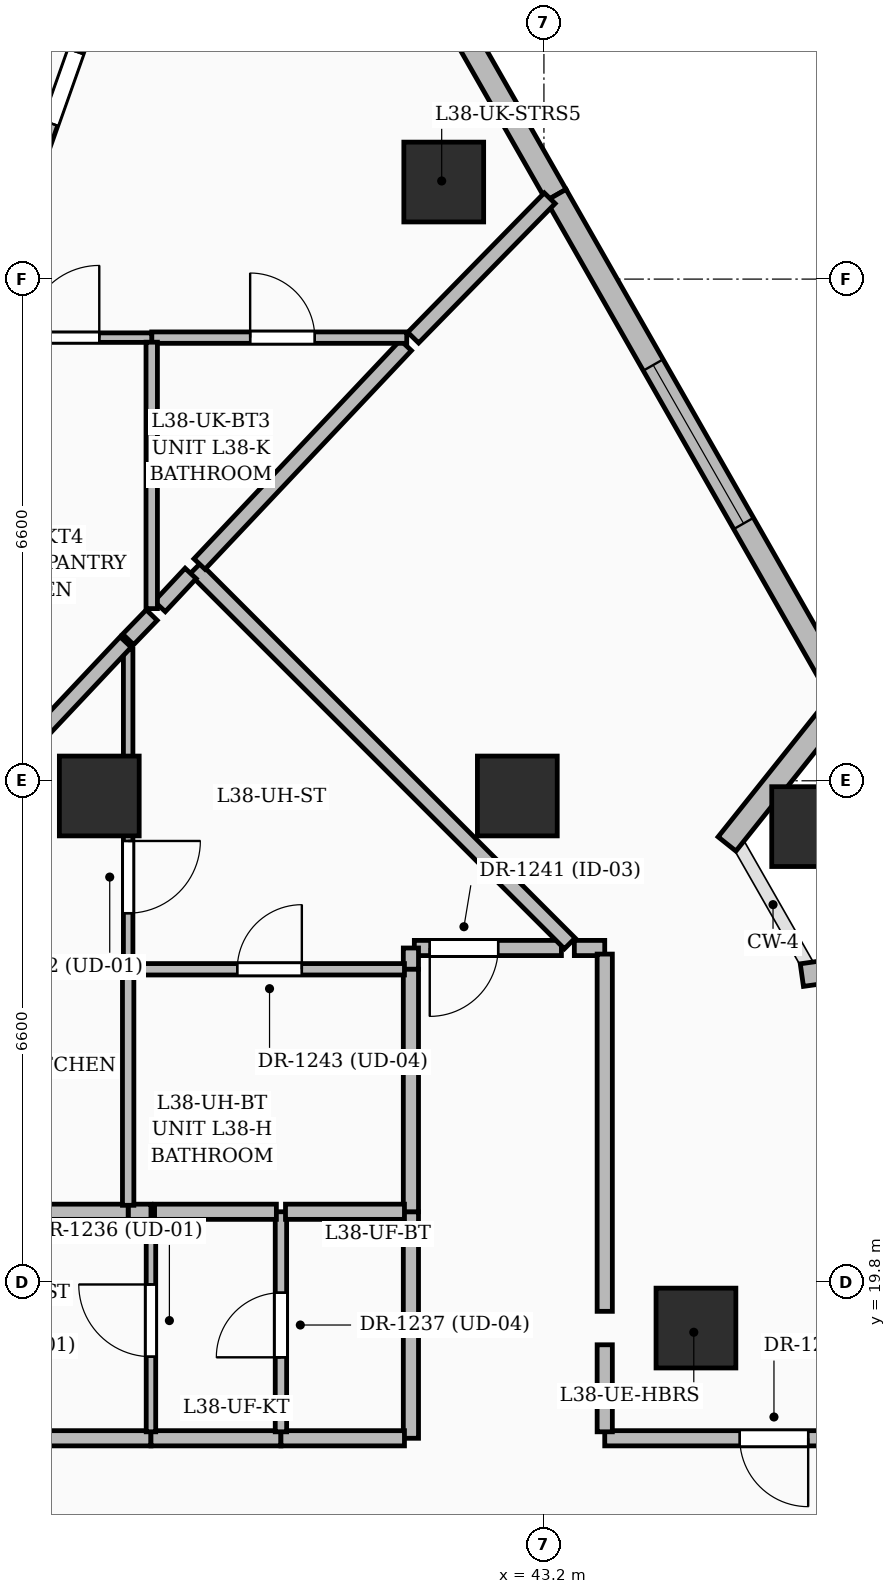
"""IFC4 building model, lengths in metres.
Left out: names, types, materials, properties, quantities, classifications, styles, units other than length and angle.
Written with IfcOpenShell. Run it as: python <this file> out.ifc"""

import sys

from ifc_helpers import new_model, si_unit, direction, frame, frame_2d, origin, origin_2d, place, context, subcontext, project, spatial, rectangle, extrude, element, fill, save


model = new_model("IFC4")
c1 = context("Model", 3, precision=1e-05, world=origin(), true_north=direction((0.0, 1.0)))
c2 = subcontext(c1, "Body", "Model", "MODEL_VIEW")
j1 = project(units=[si_unit("LENGTHUNIT", "METRE"), si_unit("PLANEANGLEUNIT", "RADIAN")], contexts=[c1])
p1 = place(None, origin())
s1 = spatial("IfcSite", under=j1, at=p1, CompositionType="ELEMENT")
p2 = place(p1, origin())
s2 = spatial("IfcBuilding", under=s1, at=p2, CompositionType="ELEMENT")
p3 = place(p2, frame((0.0, 0.0, 150.0)))
s3 = spatial("IfcBuildingStorey", under=s2, at=p3, CompositionType="ELEMENT", Elevation=150.0)
for number, where, z_axis, x_axis in (
    (1, (45.2, 19.2, 0.0), (0.0, 0.0, 1.0), (1.0, 0.0, 0.0)),
    (2, (42.85, 26.2, 0.0), (0.0, 0.0, 1.0), (1.0, 0.0, 0.0)),
    (3, (37.35, 26.2, 0.0), (0.0, 0.0, 1.0), (1.0, 0.0, 0.0)),
    (4, (46.722, 25.797, 0.0), (0.0, 0.0, 1.0), (1.0, 0.0, 0.0)),
    (5, (41.882, 34.277, 0.0), (0.0, 0.0, 1.0), (1.0, 0.0, 0.0)),
):
    element("IfcColumn", number, at=place(p3, frame(where, z_axis=z_axis, x_axis=x_axis)), inside=s3, PredefinedType="COLUMN", context=c2, shape_type="SweptSolid", body=[
        extrude(rectangle(XDim=1.05, YDim=1.05, at=origin_2d()), origin(), (0.0, 0.0, 1.0), 3.6),
    ])
p4 = place(p3, frame((39.796, 40.353, 0.0), z_axis=(0.0, 0.0, 1.0), x_axis=(0.495663635242, -0.86851457138, 0.0)))
e6 = element("IfcWall", 6, at=p4, inside=s3, PredefinedType="SOLIDWALL", context=c2, shape_type="SweptSolid", body=[
    extrude(rectangle(XDim=7.192, YDim=0.3, at=frame_2d((3.596, 0.0))), origin(), (0.0, 0.0, 1.0), 3.35),
])
p5 = place(p4, frame((3.105, 0.0, 0.8)))
e7 = element("IfcOpeningElement", 7, at=p5, cuts=e6, PredefinedType="OPENING", context=c2, shape_type="SweptSolid", body=[
    extrude(rectangle(XDim=1.2, YDim=1.8, at=frame_2d((0.6, 0.9))), frame((0.0, 0.16, 0.0), z_axis=(0.0, -1.0, 0.0), x_axis=(1.0, 0.0, 0.0)), (0.0, 0.0, 1.0), 0.32),
])
p6 = place(p3, frame((43.361, 34.106, 0.0), z_axis=(0.0, 0.0, 1.0), x_axis=(0.495668037993, -0.868512058703, 0.0)))
e8 = element("IfcWall", 8, at=p6, inside=s3, PredefinedType="SOLIDWALL", context=c2, shape_type="SweptSolid", body=[
    extrude(rectangle(XDim=7.762, YDim=0.3, at=frame_2d((3.881, 0.0))), origin(), (0.0, 0.0, 1.0), 3.35),
])
p7 = place(p6, frame((2.575, 0.0, 0.6)))
e9 = element("IfcOpeningElement", 9, at=p7, cuts=e8, PredefinedType="OPENING", context=c2, shape_type="SweptSolid", body=[
    extrude(rectangle(XDim=2.4, YDim=2.1, at=frame_2d((1.2, 1.05))), frame((0.0, 0.16, 0.0), z_axis=(0.0, -1.0, 0.0), x_axis=(1.0, 0.0, 0.0)), (0.0, 0.0, 1.0), 0.32),
])
p8 = place(p3, frame((47.052, 27.377, 0.0), z_axis=(0.0, 0.0, 1.0), x_axis=(-0.623742147588, -0.781630176825, 0.0)))
e10 = element("IfcWall", 10, at=p8, inside=s3, PredefinedType="SOLIDWALL", context=c2, shape_type="SweptSolid", body=[
    extrude(rectangle(XDim=2.313, YDim=0.3, at=frame_2d((1.157, 0.0))), origin(), (0.0, 0.0, 1.0), 2.575),
])
p9 = place(p3, frame((46.594, 23.844, 0.0), z_axis=(0.0, 0.0, 1.0), x_axis=(0.990207636063, 0.139602426493, 0.0)))
e11 = element("IfcWall", 11, at=p9, inside=s3, PredefinedType="SOLIDWALL", context=c2, shape_type="SweptSolid", body=[
    extrude(rectangle(XDim=2.594, YDim=0.3, at=frame_2d((1.297, 0.0))), origin(), (0.0, 0.0, 1.0), 2.3),
])
p10 = place(p3, frame((47.05, 17.75, 0.0), z_axis=(0.0, 0.0, 1.0), x_axis=(-1.0, 0.0, 0.0)))
e12 = element("IfcWall", 12, at=p10, inside=s3, PredefinedType="PARTITIONING", context=c2, shape_type="SweptSolid", body=[
    extrude(rectangle(XDim=3.05, YDim=0.2, at=frame_2d((1.525, 0.0))), origin(), (0.0, 0.0, 1.0), 2.436),
])
p11 = place(p10, frame((0.374, 0.0, 0.0)))
e13 = element("IfcOpeningElement", 13, at=p11, cuts=e12, PredefinedType="OPENING", context=c2, shape_type="SweptSolid", body=[
    extrude(rectangle(XDim=0.9, YDim=2.1, at=frame_2d((0.45, 1.05))), frame((0.0, 0.11, 0.0), z_axis=(0.0, -1.0, 0.0), x_axis=(1.0, 0.0, 0.0)), (0.0, 0.0, 1.0), 0.22),
])
p12 = place(p3, frame((44.0, 17.835, 0.0), z_axis=(0.0, 0.0, 1.0), x_axis=(0.0, 1.0, 0.0)))
e14 = element("IfcWall", 14, at=p12, inside=s3, PredefinedType="PARTITIONING", context=c2, shape_type="SweptSolid", body=[
    extrude(rectangle(XDim=1.145, YDim=0.2, at=frame_2d((0.573, 0.0))), origin(), (0.0, 0.0, 1.0), 3.35),
])
p13 = place(p3, frame((38.03, 17.75, 0.0), z_axis=(0.0, 0.0, 1.0), x_axis=(-1.0, 0.0, 0.0)))
e15 = element("IfcWall", 15, at=p13, inside=s3, PredefinedType="PARTITIONING", context=c2, shape_type="SweptSolid", body=[
    extrude(rectangle(XDim=6.08, YDim=0.2, at=frame_2d((3.04, 0.0))), origin(), (0.0, 0.0, 1.0), 2.436),
])
p14 = place(p13, frame((2.481, 0.0, 0.0)))
e16 = element("IfcOpeningElement", 16, at=p14, cuts=e15, PredefinedType="OPENING", context=c2, shape_type="SweptSolid", body=[
    extrude(rectangle(XDim=1.0, YDim=2.2, at=frame_2d((0.5, 1.1))), frame((0.0, 0.11, 0.0), z_axis=(0.0, -1.0, 0.0), x_axis=(1.0, 0.0, 0.0)), (0.0, 0.0, 1.0), 0.22),
])
p15 = place(p3, frame((39.74, 17.75, 0.0), z_axis=(0.0, 0.0, 1.0), x_axis=(-1.0, 0.0, 0.0)))
e17 = element("IfcWall", 17, at=p15, inside=s3, PredefinedType="PARTITIONING", context=c2, shape_type="SweptSolid", body=[
    extrude(rectangle(XDim=1.71, YDim=0.2, at=frame_2d((0.855, 0.0))), origin(), (0.0, 0.0, 1.0), 3.35),
])
p16 = place(p3, frame((41.45, 20.73, 0.0), z_axis=(0.0, 0.0, 1.0), x_axis=(0.0, -1.0, 0.0)))
e18 = element("IfcWall", 18, at=p16, inside=s3, PredefinedType="PARTITIONING", context=c2, shape_type="SweptSolid", body=[
    extrude(rectangle(XDim=2.98, YDim=0.2, at=frame_2d((1.49, 0.0))), origin(), (0.0, 0.0, 1.0), 3.35),
])
p17 = place(p3, frame((41.365, 17.75, 0.0), z_axis=(0.0, 0.0, 1.0), x_axis=(-1.0, 0.0, 0.0)))
e19 = element("IfcWall", 19, at=p17, inside=s3, PredefinedType="PARTITIONING", context=c2, shape_type="SweptSolid", body=[
    extrude(rectangle(XDim=1.625, YDim=0.2, at=frame_2d((0.812, 0.0))), origin(), (0.0, 0.0, 1.0), 3.35),
])
p18 = place(p3, frame((43.43, 24.2, 0.0), z_axis=(0.0, 0.0, 1.0), x_axis=(-1.0, 0.0, 0.0)))
e20 = element("IfcWall", 20, at=p18, inside=s3, PredefinedType="PARTITIONING", context=c2, shape_type="SweptSolid", body=[
    extrude(rectangle(XDim=1.935, YDim=0.2, at=frame_2d((0.967, 0.0))), origin(), (0.0, 0.0, 1.0), 2.436),
])
p19 = place(p18, frame((0.832, 0.0, 0.0)))
e21 = element("IfcOpeningElement", 21, at=p19, cuts=e20, PredefinedType="OPENING", context=c2, shape_type="SweptSolid", body=[
    extrude(rectangle(XDim=0.9, YDim=2.1, at=frame_2d((0.45, 1.05))), frame((0.0, 0.11, 0.0), z_axis=(0.0, -1.0, 0.0), x_axis=(1.0, 0.0, 0.0)), (0.0, 0.0, 1.0), 0.22),
])
p20 = place(p3, frame((41.45, 24.2, 0.0), z_axis=(0.0, 0.0, 1.0), x_axis=(0.0, -1.0, 0.0)))
e22 = element("IfcWall", 22, at=p20, inside=s3, PredefinedType="PARTITIONING", context=c2, shape_type="SweptSolid", body=[
    extrude(rectangle(XDim=0.28, YDim=0.2, at=frame_2d((0.14, 0.0))), origin(), (0.0, 0.0, 1.0), 3.35),
])
p21 = place(p3, frame((41.45, 23.92, 0.0), z_axis=(0.0, 0.0, 1.0), x_axis=(0.0, -1.0, 0.0)))
e23 = element("IfcWall", 23, at=p21, inside=s3, PredefinedType="PARTITIONING", context=c2, shape_type="SweptSolid", body=[
    extrude(rectangle(XDim=3.19, YDim=0.2, at=frame_2d((1.595, 0.0))), origin(), (0.0, 0.0, 1.0), 3.35),
])
p22 = place(p3, frame((44.0, 24.2, 0.0), z_axis=(0.0, 0.0, 1.0), x_axis=(-1.0, 0.0, 0.0)))
e24 = element("IfcWall", 24, at=p22, inside=s3, PredefinedType="PARTITIONING", context=c2, shape_type="SweptSolid", body=[
    extrude(rectangle(XDim=0.4, YDim=0.2, at=frame_2d((0.2, 0.0))), origin(), (0.0, 0.0, 1.0), 2.436),
])
p23 = place(p3, frame((38.03, 17.835, 0.0), z_axis=(0.0, 0.0, 1.0), x_axis=(0.0, 1.0, 0.0)))
e25 = element("IfcWall", 25, at=p23, inside=s3, PredefinedType="PARTITIONING", context=c2, shape_type="SweptSolid", body=[
    extrude(rectangle(XDim=2.895, YDim=0.125, at=frame_2d((1.448, 0.0))), origin(), (0.0, 0.0, 1.0), 3.35),
])
p24 = place(p23, frame((0.988, 0.0, 0.0)))
e26 = element("IfcOpeningElement", 26, at=p24, cuts=e25, PredefinedType="OPENING", context=c2, shape_type="SweptSolid", body=[
    extrude(rectangle(XDim=0.95, YDim=2.2, at=frame_2d((0.475, 1.1))), frame((0.0, 0.072, 0.0), z_axis=(0.0, -1.0, 0.0), x_axis=(1.0, 0.0, 0.0)), (0.0, 0.0, 1.0), 0.145),
])
p25 = place(p3, frame((38.03, 20.73, 0.0), z_axis=(0.0, 0.0, 1.0), x_axis=(-1.0, 0.0, 0.0)))
e27 = element("IfcWall", 27, at=p25, inside=s3, PredefinedType="PARTITIONING", context=c2, shape_type="SweptSolid", body=[
    extrude(rectangle(XDim=0.3, YDim=0.2, at=frame_2d((0.15, 0.0))), origin(), (0.0, 0.0, 1.0), 3.35),
])
p26 = place(p3, frame((37.73, 20.73, 0.0), z_axis=(0.0, 0.0, 1.0), x_axis=(-1.0, 0.0, 0.0)))
e28 = element("IfcWall", 28, at=p26, inside=s3, PredefinedType="PARTITIONING", context=c2, shape_type="SweptSolid", body=[
    extrude(rectangle(XDim=5.695, YDim=0.2, at=frame_2d((2.848, 0.0))), origin(), (0.0, 0.0, 1.0), 1.12),
])
p27 = place(p3, frame((39.74, 17.835, 0.0), z_axis=(0.0, 0.0, 1.0), x_axis=(0.0, 1.0, 0.0)))
e29 = element("IfcWall", 29, at=p27, inside=s3, PredefinedType="PARTITIONING", context=c2, shape_type="SweptSolid", body=[
    extrude(rectangle(XDim=2.895, YDim=0.15, at=frame_2d((1.448, 0.0))), origin(), (0.0, 0.0, 1.0), 3.35),
])
p28 = place(p27, frame((0.98, 0.0, 0.0)))
e30 = element("IfcOpeningElement", 30, at=p28, cuts=e29, PredefinedType="OPENING", context=c2, shape_type="SweptSolid", body=[
    extrude(rectangle(XDim=0.85, YDim=2.1, at=frame_2d((0.425, 1.05))), frame((0.0, 0.085, 0.0), z_axis=(0.0, -1.0, 0.0), x_axis=(1.0, 0.0, 0.0)), (0.0, 0.0, 1.0), 0.17),
])
p29 = place(p3, frame((39.68, 20.73, 0.0), z_axis=(0.0, 0.0, 1.0), x_axis=(-1.0, 0.0, 0.0)))
e31 = element("IfcWall", 31, at=p29, inside=s3, PredefinedType="PARTITIONING", context=c2, shape_type="SweptSolid", body=[
    extrude(rectangle(XDim=1.603, YDim=0.2, at=frame_2d((0.801, 0.0))), origin(), (0.0, 0.0, 1.0), 3.35),
])
p30 = place(p3, frame((41.365, 20.73, 0.0), z_axis=(0.0, 0.0, 1.0), x_axis=(-1.0, 0.0, 0.0)))
e32 = element("IfcWall", 32, at=p30, inside=s3, PredefinedType="PARTITIONING", context=c2, shape_type="SweptSolid", body=[
    extrude(rectangle(XDim=1.565, YDim=0.2, at=frame_2d((0.782, 0.0))), origin(), (0.0, 0.0, 1.0), 3.35),
])
p31 = place(p3, frame((37.73, 23.92, 0.0), z_axis=(0.0, 0.0, 1.0), x_axis=(1.0, 0.0, 0.0)))
e33 = element("IfcWall", 33, at=p31, inside=s3, PredefinedType="PARTITIONING", context=c2, shape_type="SweptSolid", body=[
    extrude(rectangle(XDim=3.635, YDim=0.15, at=frame_2d((1.817, 0.0))), origin(), (0.0, 0.0, 1.0), 3.35),
])
p32 = place(p31, frame((1.435, 0.0, 0.0)))
e34 = element("IfcOpeningElement", 34, at=p32, cuts=e33, PredefinedType="OPENING", context=c2, shape_type="SweptSolid", body=[
    extrude(rectangle(XDim=0.85, YDim=2.1, at=frame_2d((0.425, 1.05))), frame((0.0, 0.085, 0.0), z_axis=(0.0, -1.0, 0.0), x_axis=(1.0, 0.0, 0.0)), (0.0, 0.0, 1.0), 0.17),
])
p33 = place(p3, frame((37.73, 28.13, 0.0), z_axis=(0.0, 0.0, 1.0), x_axis=(0.0, -1.0, 0.0)))
e35 = element("IfcWall", 35, at=p33, inside=s3, PredefinedType="PARTITIONING", context=c2, shape_type="SweptSolid", body=[
    extrude(rectangle(XDim=4.15, YDim=0.125, at=frame_2d((2.075, 0.0))), origin(), (0.0, 0.0, 1.0), 3.35),
])
p34 = place(p33, frame((2.522, 0.0, 0.0)))
e36 = element("IfcOpeningElement", 36, at=p34, cuts=e35, PredefinedType="OPENING", context=c2, shape_type="SweptSolid", body=[
    extrude(rectangle(XDim=0.95, YDim=2.2, at=frame_2d((0.475, 1.1))), frame((0.0, 0.072, 0.0), z_axis=(0.0, -1.0, 0.0), x_axis=(1.0, 0.0, 0.0)), (0.0, 0.0, 1.0), 0.145),
])
p35 = place(p3, frame((43.54, 24.26, 0.0), z_axis=(0.0, 0.0, 1.0), x_axis=(-0.707089271826, 0.707124290114, 0.0)))
e37 = element("IfcWall", 37, at=p35, inside=s3, PredefinedType="PARTITIONING", context=c2, shape_type="SweptSolid", body=[
    extrude(rectangle(XDim=6.972, YDim=0.2, at=frame_2d((3.486, 0.0))), origin(), (0.0, 0.0, 1.0), 2.37),
])
p36 = place(p3, frame((38.552, 29.128, 0.0), z_axis=(0.0, 0.0, 1.0), x_axis=(-0.682698223225, -0.730700442045, 0.0)))
e38 = element("IfcWall", 38, at=p36, inside=s3, PredefinedType="PARTITIONING", context=c2, shape_type="SweptSolid", body=[
    extrude(rectangle(XDim=0.595, YDim=0.2, at=frame_2d((0.297, 0.0))), origin(), (0.0, 0.0, 1.0), 3.35),
])
p37 = place(p3, frame((38.04, 28.58, 0.0), z_axis=(0.0, 0.0, 1.0), x_axis=(-0.695786383721, -0.718248778786, 0.0)))
e39 = element("IfcWall", 39, at=p37, inside=s3, PredefinedType="PARTITIONING", context=c2, shape_type="SweptSolid", body=[
    extrude(rectangle(XDim=0.446, YDim=0.2, at=frame_2d((0.223, 0.0))), origin(), (0.0, 0.0, 1.0), 2.86),
])
p38 = place(p3, frame((37.73, 23.86, 0.0), z_axis=(0.0, 0.0, 1.0), x_axis=(0.0, -1.0, 0.0)))
e40 = element("IfcWall", 40, at=p38, inside=s3, PredefinedType="PARTITIONING", context=c2, shape_type="SweptSolid", body=[
    extrude(rectangle(XDim=3.045, YDim=0.15, at=frame_2d((1.522, 0.0))), origin(), (0.0, 0.0, 1.0), 3.35),
])
p39 = place(p3, frame((37.698, 28.225, 0.0), z_axis=(0.0, 0.0, 1.0), x_axis=(-0.685445151362, -0.728124264445, 0.0)))
e41 = element("IfcWall", 41, at=p39, inside=s3, PredefinedType="PARTITIONING", context=c2, shape_type="SweptSolid", body=[
    extrude(rectangle(XDim=8.14, YDim=0.2, at=frame_2d((4.07, 0.0))), origin(), (0.0, 0.0, 1.0), 1.12),
])
p40 = place(p3, frame((43.276, 34.064, 0.0), z_axis=(0.0, 0.0, 1.0), x_axis=(-0.699649070919, -0.714486653173, 0.0)))
e42 = element("IfcWall", 42, at=p40, inside=s3, PredefinedType="PARTITIONING", context=c2, shape_type="SweptSolid", body=[
    extrude(rectangle(XDim=2.567, YDim=0.2, at=frame_2d((1.283, 0.0))), origin(), (0.0, 0.0, 1.0), 1.12),
])
p41 = place(p3, frame((41.384, 32.128, 0.0), z_axis=(0.0, 0.0, 1.0), x_axis=(-0.686445904879, -0.727180871362, 0.0)))
e43 = element("IfcWall", 43, at=p41, inside=s3, PredefinedType="PARTITIONING", context=c2, shape_type="SweptSolid", body=[
    extrude(rectangle(XDim=3.956, YDim=0.2, at=frame_2d((1.978, 0.0))), origin(), (0.0, 0.0, 1.0), 2.86),
])
p42 = place(p3, frame((35.71, 32.23, 0.0), z_axis=(0.0, 0.0, 1.0), x_axis=(0.333750909116, 0.942661302199, 0.0)))
e44 = element("IfcWall", 44, at=p42, inside=s3, PredefinedType="PARTITIONING", context=c2, shape_type="SweptSolid", body=[
    extrude(rectangle(XDim=6.763, YDim=0.2, at=frame_2d((3.381, 0.0))), origin(), (0.0, 0.0, 1.0), 2.57),
])
p43 = place(p42, frame((2.993, 0.0, 0.0)))
e45 = element("IfcOpeningElement", 45, at=p43, cuts=e44, PredefinedType="OPENING", context=c2, shape_type="SweptSolid", body=[
    extrude(rectangle(XDim=1.0, YDim=2.2, at=frame_2d((0.5, 1.1))), frame((0.0, 0.11, 0.0), z_axis=(0.0, -1.0, 0.0), x_axis=(1.0, 0.0, 0.0)), (0.0, 0.0, 1.0), 0.22),
])
p44 = place(p3, frame((38.04, 32.23, 0.0), z_axis=(0.0, 0.0, 1.0), x_axis=(1.0, 0.0, 0.0)))
e46 = element("IfcWall", 46, at=p44, inside=s3, PredefinedType="PARTITIONING", context=c2, shape_type="SweptSolid", body=[
    extrude(rectangle(XDim=3.355, YDim=0.15, at=frame_2d((1.677, 0.0))), origin(), (0.0, 0.0, 1.0), 3.35),
])
p45 = place(p44, frame((1.295, 0.0, 0.0)))
e47 = element("IfcOpeningElement", 47, at=p45, cuts=e46, PredefinedType="OPENING", context=c2, shape_type="SweptSolid", body=[
    extrude(rectangle(XDim=0.85, YDim=2.1, at=frame_2d((0.425, 1.05))), frame((0.0, 0.085, 0.0), z_axis=(0.0, -1.0, 0.0), x_axis=(1.0, 0.0, 0.0)), (0.0, 0.0, 1.0), 0.17),
])
p46 = place(p3, frame((35.795, 32.23, 0.0), z_axis=(0.0, 0.0, 1.0), x_axis=(1.0, 0.0, 0.0)))
e48 = element("IfcWall", 48, at=p46, inside=s3, PredefinedType="PARTITIONING", context=c2, shape_type="SweptSolid", body=[
    extrude(rectangle(XDim=2.245, YDim=0.125, at=frame_2d((1.123, 0.0))), origin(), (0.0, 0.0, 1.0), 3.35),
])
p47 = place(p46, frame((0.605, 0.0, 0.0)))
e49 = element("IfcOpeningElement", 49, at=p47, cuts=e48, PredefinedType="OPENING", context=c2, shape_type="SweptSolid", body=[
    extrude(rectangle(XDim=0.95, YDim=2.2, at=frame_2d((0.475, 1.1))), frame((0.0, 0.072, 0.0), z_axis=(0.0, -1.0, 0.0), x_axis=(1.0, 0.0, 0.0)), (0.0, 0.0, 1.0), 0.145),
])
p48 = place(p3, frame((38.04, 32.17, 0.0), z_axis=(0.0, 0.0, 1.0), x_axis=(0.0, -1.0, 0.0)))
e50 = element("IfcWall", 50, at=p48, inside=s3, PredefinedType="PARTITIONING", context=c2, shape_type="SweptSolid", body=[
    extrude(rectangle(XDim=3.505, YDim=0.15, at=frame_2d((1.752, 0.0))), origin(), (0.0, 0.0, 1.0), 2.86),
])
p49 = place(p3, frame((44.0, 19.42, 0.0), z_axis=(0.0, 0.0, 1.0), x_axis=(0.0, 1.0, 0.0)))
e51 = element("IfcWall", 51, at=p49, inside=s3, PredefinedType="PARTITIONING", context=c2, shape_type="SweptSolid", body=[
    extrude(rectangle(XDim=4.7, YDim=0.2, at=frame_2d((2.35, 0.0))), origin(), (0.0, 0.0, 1.0), 2.436),
])
p50 = place(p7, origin())
e52 = element("IfcWindow", 52, at=p50, inside=s3, PartitioningType="SINGLE_PANEL", PredefinedType="WINDOW", context=c2, shape_type="SweptSolid", body=[
    extrude(rectangle(XDim=2.4, YDim=2.1, at=frame_2d((1.2, 1.05))), frame((0.0, 0.03, 0.0), z_axis=(0.0, -1.0, 0.0), x_axis=(1.0, 0.0, 0.0)), (0.0, 0.0, 1.0), 0.06),
])
fill(e9, e52)
p51 = place(p24, origin())
e53 = element("IfcDoor", 53, at=p51, inside=s3, OperationType="SINGLE_SWING_RIGHT", PredefinedType="DOOR", context=c2, shape_type="SweptSolid", body=[
    extrude(rectangle(XDim=0.95, YDim=2.2, at=frame_2d((0.475, 1.1))), frame((0.0, 0.025, 0.0), z_axis=(0.0, -1.0, 0.0), x_axis=(1.0, 0.0, 0.0)), (0.0, 0.0, 1.0), 0.05),
])
fill(e26, e53)
p52 = place(p28, origin())
e54 = element("IfcDoor", 54, at=p52, inside=s3, OperationType="SINGLE_SWING_LEFT", PredefinedType="DOOR", context=c2, shape_type="SweptSolid", body=[
    extrude(rectangle(XDim=0.85, YDim=2.1, at=frame_2d((0.425, 1.05))), frame((0.0, 0.025, 0.0), z_axis=(0.0, -1.0, 0.0), x_axis=(1.0, 0.0, 0.0)), (0.0, 0.0, 1.0), 0.05),
])
fill(e30, e54)
p53 = place(p19, origin())
e55 = element("IfcDoor", 55, at=p53, inside=s3, OperationType="SINGLE_SWING_RIGHT", PredefinedType="DOOR", context=c2, shape_type="SweptSolid", body=[
    extrude(rectangle(XDim=0.9, YDim=2.1, at=frame_2d((0.45, 1.05))), frame((0.0, 0.025, 0.0), z_axis=(0.0, -1.0, 0.0), x_axis=(1.0, 0.0, 0.0)), (0.0, 0.0, 1.0), 0.05),
])
fill(e21, e55)
p54 = place(p34, origin())
e56 = element("IfcDoor", 56, at=p54, inside=s3, OperationType="SINGLE_SWING_LEFT", PredefinedType="DOOR", context=c2, shape_type="SweptSolid", body=[
    extrude(rectangle(XDim=0.95, YDim=2.2, at=frame_2d((0.475, 1.1))), frame((0.0, 0.025, 0.0), z_axis=(0.0, -1.0, 0.0), x_axis=(1.0, 0.0, 0.0)), (0.0, 0.0, 1.0), 0.05),
])
fill(e36, e56)
p55 = place(p32, origin())
e57 = element("IfcDoor", 57, at=p55, inside=s3, OperationType="SINGLE_SWING_RIGHT", PredefinedType="DOOR", context=c2, shape_type="SweptSolid", body=[
    extrude(rectangle(XDim=0.85, YDim=2.1, at=frame_2d((0.425, 1.05))), frame((0.0, 0.025, 0.0), z_axis=(0.0, -1.0, 0.0), x_axis=(1.0, 0.0, 0.0)), (0.0, 0.0, 1.0), 0.05),
])
fill(e34, e57)
p56 = place(p47, origin())
e58 = element("IfcDoor", 58, at=p56, inside=s3, OperationType="SINGLE_SWING_RIGHT", PredefinedType="DOOR", context=c2, shape_type="SweptSolid", body=[
    extrude(rectangle(XDim=0.95, YDim=2.2, at=frame_2d((0.475, 1.1))), frame((0.0, 0.025, 0.0), z_axis=(0.0, -1.0, 0.0), x_axis=(1.0, 0.0, 0.0)), (0.0, 0.0, 1.0), 0.05),
])
fill(e49, e58)
p57 = place(p45, origin())
e59 = element("IfcDoor", 59, at=p57, inside=s3, OperationType="SINGLE_SWING_LEFT", PredefinedType="DOOR", context=c2, shape_type="SweptSolid", body=[
    extrude(rectangle(XDim=0.85, YDim=2.1, at=frame_2d((0.425, 1.05))), frame((0.0, 0.025, 0.0), z_axis=(0.0, -1.0, 0.0), x_axis=(1.0, 0.0, 0.0)), (0.0, 0.0, 1.0), 0.05),
])
fill(e47, e59)
p58 = place(p43, origin())
e60 = element("IfcDoor", 60, at=p58, inside=s3, OperationType="SINGLE_SWING_RIGHT", PredefinedType="DOOR", context=c2, shape_type="SweptSolid", body=[
    extrude(rectangle(XDim=1.0, YDim=2.2, at=frame_2d((0.5, 1.1))), frame((0.0, 0.025, 0.0), z_axis=(0.0, -1.0, 0.0), x_axis=(1.0, 0.0, 0.0)), (0.0, 0.0, 1.0), 0.05),
])
fill(e45, e60)
p59 = place(p11, origin())
e61 = element("IfcDoor", 61, at=p59, inside=s3, OperationType="SINGLE_SWING_LEFT", PredefinedType="DOOR", context=c2, shape_type="SweptSolid", body=[
    extrude(rectangle(XDim=0.9, YDim=2.1, at=frame_2d((0.45, 1.05))), frame((0.0, 0.025, 0.0), z_axis=(0.0, -1.0, 0.0), x_axis=(1.0, 0.0, 0.0)), (0.0, 0.0, 1.0), 0.05),
])
fill(e13, e61)
save(model, sys.argv[1])
